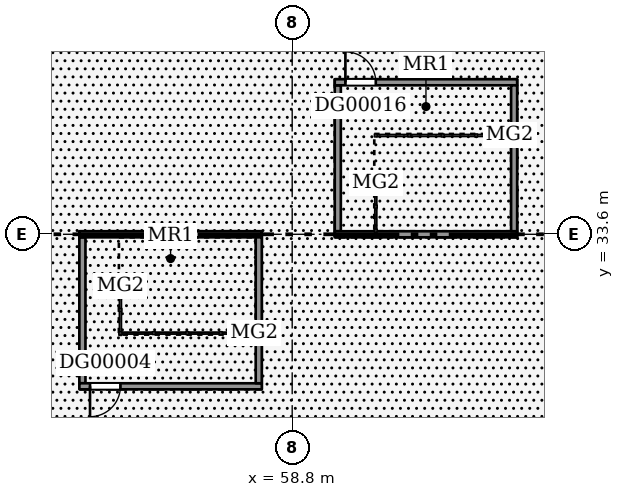
"""IFC4 building model, lengths in metres.
Left out: names, types, materials, properties, quantities, classifications, styles, units other than length and angle.
Written with IfcOpenShell. Run it as: python <this file> out.ifc"""

import sys

from ifc_helpers import new_model, si_unit, direction, frame, frame_2d, origin, place, context, subcontext, project, spatial, rectangle, extrude, element, fill, save


model = new_model("IFC4")
c1 = context("Model", 3, precision=1e-05, world=origin(), true_north=direction((0.0, 1.0)))
c2 = subcontext(c1, "Body", "Model", "MODEL_VIEW")
j1 = project(units=[si_unit("LENGTHUNIT", "METRE"), si_unit("PLANEANGLEUNIT", "RADIAN")], contexts=[c1])
p1 = place(None, origin())
s1 = spatial("IfcSite", under=j1, at=p1, CompositionType="ELEMENT")
p2 = place(p1, origin())
s2 = spatial("IfcBuilding", under=s1, at=p2, CompositionType="ELEMENT")
p3 = place(p2, origin())
s3 = spatial("IfcBuildingStorey", under=s2, at=p3, CompositionType="ELEMENT", Elevation=0.0)
p4 = place(p3, frame((51.9, 28.7, 0.0), z_axis=(0.0, 0.0, 1.0), x_axis=(0.0, 1.0, 0.0)))
e1 = element("IfcWall", 1, at=p4, inside=s3, PredefinedType="SOLIDWALL", context=c2, shape_type="SweptSolid", body=[
    extrude(rectangle(XDim=4.8, YDim=0.2, at=frame_2d((2.4, 0.0))), origin(), (0.0, 0.0, 1.0), 3.6),
])
p5 = place(p3, frame((51.8, 28.6, 0.0), z_axis=(0.0, 0.0, 1.0), x_axis=(1.0, 0.0, 0.0)))
e2 = element("IfcWall", 2, at=p5, inside=s3, PredefinedType="SOLIDWALL", context=c2, shape_type="SweptSolid", body=[
    extrude(rectangle(XDim=6.0, YDim=0.2, at=frame_2d((3.0, 0.0))), origin(), (0.0, 0.0, 1.0), 3.6),
])
p6 = place(p5, frame((0.35, 0.0, 0.0)))
e3 = element("IfcOpeningElement", 3, at=p6, cuts=e2, PredefinedType="OPENING", context=c2, shape_type="SweptSolid", body=[
    extrude(rectangle(XDim=1.0, YDim=2.1, at=frame_2d((0.5, 1.05))), frame((0.0, 0.11, 0.0), z_axis=(0.0, -1.0, 0.0), x_axis=(1.0, 0.0, 0.0)), (0.0, 0.0, 1.0), 0.22),
])
p7 = place(p3, frame((51.8, 33.6, 0.0), z_axis=(0.0, 0.0, 1.0), x_axis=(1.0, 0.0, 0.0)))
e4 = element("IfcWall", 4, at=p7, inside=s3, PredefinedType="SOLIDWALL", context=c2, shape_type="SweptSolid", body=[
    extrude(rectangle(XDim=6.0, YDim=0.2, at=frame_2d((3.0, 0.0))), origin(), (0.0, 0.0, 1.0), 3.6),
])
for number, where, z_axis, x_axis in (
    (5, (57.7, 28.7, 0.0), (0.0, 0.0, 1.0), (0.0, 1.0, 0.0)),
    (6, (60.3, 33.7, 0.0), (0.0, 0.0, 1.0), (0.0, 1.0, 0.0)),
):
    element("IfcWall", number, at=place(p3, frame(where, z_axis=z_axis, x_axis=x_axis)), inside=s3, PredefinedType="SOLIDWALL", context=c2, shape_type="SweptSolid", body=[
        extrude(rectangle(XDim=4.8, YDim=0.2, at=frame_2d((2.4, 0.0))), origin(), (0.0, 0.0, 1.0), 3.6),
    ])
p8 = place(p3, frame((60.2, 33.6, 0.0), z_axis=(0.0, 0.0, 1.0), x_axis=(1.0, 0.0, 0.0)))
e7 = element("IfcWall", 7, at=p8, inside=s3, PredefinedType="SOLIDWALL", context=c2, shape_type="SweptSolid", body=[
    extrude(rectangle(XDim=6.0, YDim=0.2, at=frame_2d((3.0, 0.0))), origin(), (0.0, 0.0, 1.0), 3.6),
])
p9 = place(p3, frame((60.2, 38.6, 0.0), z_axis=(0.0, 0.0, 1.0), x_axis=(1.0, 0.0, 0.0)))
e8 = element("IfcWall", 8, at=p9, inside=s3, PredefinedType="SOLIDWALL", context=c2, shape_type="SweptSolid", body=[
    extrude(rectangle(XDim=6.0, YDim=0.2, at=frame_2d((3.0, 0.0))), origin(), (0.0, 0.0, 1.0), 3.6),
])
p10 = place(p9, frame((0.35, 0.0, 0.0)))
e9 = element("IfcOpeningElement", 9, at=p10, cuts=e8, PredefinedType="OPENING", context=c2, shape_type="SweptSolid", body=[
    extrude(rectangle(XDim=1.0, YDim=2.1, at=frame_2d((0.5, 1.05))), frame((0.0, 0.11, 0.0), z_axis=(0.0, -1.0, 0.0), x_axis=(1.0, 0.0, 0.0)), (0.0, 0.0, 1.0), 0.22),
])
p11 = place(p3, frame((66.1, 33.7, 0.0), z_axis=(0.0, 0.0, 1.0), x_axis=(0.0, 1.0, 0.0)))
e10 = element("IfcWall", 10, at=p11, inside=s3, PredefinedType="SOLIDWALL", context=c2, shape_type="SweptSolid", body=[
    extrude(rectangle(XDim=4.8, YDim=0.2, at=frame_2d((2.4, 0.0))), origin(), (0.0, 0.0, 1.0), 3.6),
])
p12 = place(p6, frame((1.0, 0.0, 0.0), z_axis=(0.0, 0.0, 1.0), x_axis=(-1.0, 0.0, 0.0)))
e11 = element("IfcDoor", 11, at=p12, inside=s3, OperationType="SINGLE_SWING_RIGHT", PredefinedType="DOOR", context=c2, shape_type="SweptSolid", body=[
    extrude(rectangle(XDim=1.0, YDim=2.1, at=frame_2d((0.5, 1.05))), frame((0.0, 0.025, 0.0), z_axis=(0.0, -1.0, 0.0), x_axis=(1.0, 0.0, 0.0)), (0.0, 0.0, 1.0), 0.05),
])
fill(e3, e11)
p13 = place(p10, origin())
e12 = element("IfcDoor", 12, at=p13, inside=s3, OperationType="SINGLE_SWING_LEFT", PredefinedType="DOOR", context=c2, shape_type="SweptSolid", body=[
    extrude(rectangle(XDim=1.0, YDim=2.1, at=frame_2d((0.5, 1.05))), frame((0.0, 0.025, 0.0), z_axis=(0.0, -1.0, 0.0), x_axis=(1.0, 0.0, 0.0)), (0.0, 0.0, 1.0), 0.05),
])
fill(e9, e12)
save(model, sys.argv[1])
